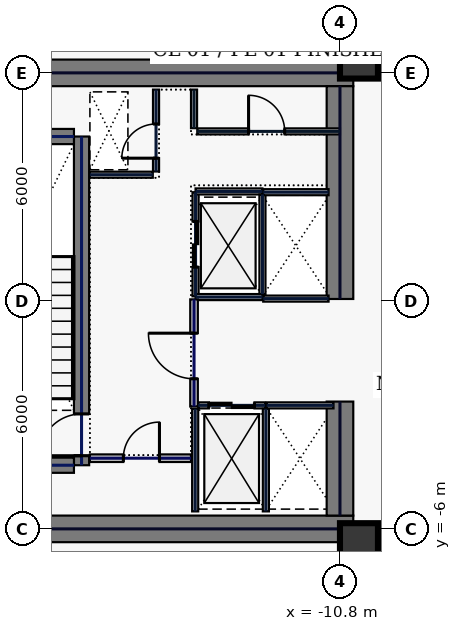
"""IFC4 building model, lengths in metres.
Left out: names, types, materials, properties, quantities, classifications, styles, units other than length and angle.
Written with IfcOpenShell. Run it as: python <this file> out.ifc"""

import sys

from ifc_helpers import new_model, si_unit, direction, frame, frame_2d, origin, origin_2d, place, context, subcontext, project, spatial, rectangle, hollow_rectangle, extrude, element, fill, save


model = new_model("IFC4")
c1 = context("Model", 3, precision=1e-05, world=origin(), true_north=direction((0.0, 1.0)))
c2 = subcontext(c1, "Body", "Model", "MODEL_VIEW")
j1 = project(units=[si_unit("LENGTHUNIT", "METRE"), si_unit("PLANEANGLEUNIT", "RADIAN")], contexts=[c1])
p1 = place(None, origin())
s1 = spatial("IfcSite", under=j1, at=p1, CompositionType="ELEMENT")
p2 = place(p1, origin())
s2 = spatial("IfcBuilding", under=s1, at=p2, CompositionType="ELEMENT")
p3 = place(p2, frame((0.0, 0.0, 93.4)))
s3 = spatial("IfcBuildingStorey", under=s2, at=p3, CompositionType="ELEMENT", Elevation=93.4)
for number, where, z_axis, x_axis in (
    (1, (-22.0, 6.0, 0.0), (0.0, 0.0, 1.0), (1.0, 0.0, 0.0)),
    (2, (-22.0, -6.0, 0.0), (0.0, 0.0, 1.0), (1.0, 0.0, 0.0)),
):
    element("IfcWall", number, at=place(p3, frame(where, z_axis=z_axis, x_axis=x_axis)), inside=s3, PredefinedType="SHEAR", context=c2, shape_type="SweptSolid", body=[
        extrude(rectangle(XDim=11.55, YDim=0.7, at=frame_2d((5.775, 0.0))), origin(), (0.0, 0.0, 1.0), 3.74),
    ])
p4 = place(p3, frame((-10.8, -5.65, 0.0), z_axis=(0.0, 0.0, 1.0), x_axis=(0.0, 1.0, 0.0)))
e3 = element("IfcWall", 3, at=p4, inside=s3, PredefinedType="SHEAR", context=c2, shape_type="SweptSolid", body=[
    extrude(rectangle(XDim=3.0, YDim=0.7, at=frame_2d((1.5, 0.0))), origin(), (0.0, 0.0, 1.0), 3.74),
])
p5 = place(p3, frame((-10.8, 0.05, 0.0), z_axis=(0.0, 0.0, 1.0), x_axis=(0.0, 1.0, 0.0)))
e4 = element("IfcWall", 4, at=p5, inside=s3, PredefinedType="SHEAR", context=c2, shape_type="SweptSolid", body=[
    extrude(rectangle(XDim=5.6, YDim=0.7, at=frame_2d((2.8, 0.0))), origin(), (0.0, 0.0, 1.0), 3.74),
])
p6 = place(p3, frame((-17.6, -4.325, 0.0), z_axis=(0.0, 0.0, 1.0), x_axis=(0.0, 1.0, 0.0)))
e5 = element("IfcWall", 5, at=p6, inside=s3, PredefinedType="SHEAR", context=c2, shape_type="SweptSolid", body=[
    extrude(rectangle(XDim=8.65, YDim=0.4, at=frame_2d((4.325, 0.0))), origin(), (0.0, 0.0, 1.0), 3.74),
])
p7 = place(p6, frame((0.25, 0.0, 0.0)))
e6 = element("IfcOpeningElement", 6, at=p7, cuts=e5, PredefinedType="OPENING", context=c2, shape_type="SweptSolid", body=[
    extrude(rectangle(XDim=1.1, YDim=2.2, at=frame_2d((0.55, 1.1))), frame((0.0, 0.21, 0.0), z_axis=(0.0, -1.0, 0.0), x_axis=(1.0, 0.0, 0.0)), (0.0, 0.0, 1.0), 0.42),
])
for number, where, z_axis, x_axis in (
    (7, (-21.2, -4.325, 0.0), (0.0, 0.0, 1.0), (1.0, 0.0, 0.0)),
    (8, (-21.2, 4.325, 0.0), (0.0, 0.0, 1.0), (1.0, 0.0, 0.0)),
):
    element("IfcWall", number, at=place(p3, frame(where, z_axis=z_axis, x_axis=x_axis)), inside=s3, PredefinedType="SHEAR", context=c2, shape_type="SweptSolid", body=[
        extrude(rectangle(XDim=3.4, YDim=0.4, at=frame_2d((1.7, 0.0))), origin(), (0.0, 0.0, 1.0), 3.74),
    ])
for number, where, z_axis, x_axis in (
    (9, (-10.3, -6.35, 0.0), (0.0, 0.0, 1.0), (1.0, 0.0, 0.0)),
    (10, (-10.3, 6.35, 0.0), (0.0, 0.0, 1.0), (1.0, 0.0, 0.0)),
):
    element("IfcColumn", number, at=place(p3, frame(where, z_axis=z_axis, x_axis=x_axis)), inside=s3, PredefinedType="COLUMN", context=c2, shape_type="SweptSolid", body=[
        extrude(hollow_rectangle(XDim=1.0, YDim=1.0, WallThickness=0.045, at=origin_2d()), origin(), (0.0, 0.0, 1.0), 3.74),
    ])
p8 = place(p3, frame((-14.6, 0.12, 0.0), z_axis=(0.0, 0.0, 1.0), x_axis=(0.0, 1.0, 0.0)))
e11 = element("IfcWall", 11, at=p8, inside=s3, PredefinedType="PARTITIONING", context=c2, shape_type="SweptSolid", body=[
    extrude(rectangle(XDim=2.74, YDim=0.16, at=frame_2d((1.37, 0.0))), origin(), (0.0, 0.0, 1.0), 3.74),
])
p9 = place(p8, frame((0.77, 0.0, 0.0)))
e12 = element("IfcOpeningElement", 12, at=p9, cuts=e11, PredefinedType="OPENING", context=c2, shape_type="SweptSolid", body=[
    extrude(rectangle(XDim=1.2, YDim=2.2, at=frame_2d((0.6, 1.1))), frame((0.0, 0.09, 0.0), z_axis=(0.0, -1.0, 0.0), x_axis=(1.0, 0.0, 0.0)), (0.0, 0.0, 1.0), 0.18),
])
for number, where, z_axis, x_axis in (
    (13, (-14.6, 0.1, 0.0), (0.0, 0.0, 1.0), (1.0, 0.0, 0.0)),
    (14, (-14.6, 2.88, 0.0), (0.0, 0.0, 1.0), (1.0, 0.0, 0.0)),
):
    element("IfcWall", number, at=place(p3, frame(where, z_axis=z_axis, x_axis=x_axis)), inside=s3, PredefinedType="PARTITIONING", context=c2, shape_type="SweptSolid", body=[
        extrude(rectangle(XDim=1.76, YDim=0.16, at=frame_2d((0.88, 0.0))), origin(), (0.0, 0.0, 1.0), 3.74),
    ])
p10 = place(p3, frame((-12.84, 0.18, 0.0), z_axis=(0.0, 0.0, 1.0), x_axis=(0.0, 1.0, 0.0)))
e15 = element("IfcWall", 15, at=p10, inside=s3, PredefinedType="PARTITIONING", context=c2, shape_type="SweptSolid", body=[
    extrude(rectangle(XDim=2.62, YDim=0.16, at=frame_2d((1.31, 0.0))), origin(), (0.0, 0.0, 1.0), 3.74),
])
p11 = place(p3, frame((-14.53, -2.75, 0.0), z_axis=(0.0, 0.0, 1.0), x_axis=(1.0, 0.0, 0.0)))
e16 = element("IfcWall", 16, at=p11, inside=s3, PredefinedType="PARTITIONING", context=c2, shape_type="SweptSolid", body=[
    extrude(rectangle(XDim=1.76, YDim=0.16, at=frame_2d((0.88, 0.0))), origin(), (0.0, 0.0, 1.0), 3.74),
])
p12 = place(p11, frame((0.28, 0.0, 0.0)))
e17 = element("IfcOpeningElement", 17, at=p12, cuts=e16, PredefinedType="OPENING", context=c2, shape_type="SweptSolid", body=[
    extrude(rectangle(XDim=1.2, YDim=2.2, at=frame_2d((0.6, 1.1))), frame((0.0, 0.09, 0.0), z_axis=(0.0, -1.0, 0.0), x_axis=(1.0, 0.0, 0.0)), (0.0, 0.0, 1.0), 0.18),
])
for number, where, z_axis, x_axis in (
    (18, (-12.75, -5.54, 0.0), (0.0, 0.0, 1.0), (0.0, 1.0, 0.0)),
    (19, (-14.61, -5.54, 0.0), (0.0, 0.0, 1.0), (0.0, 1.0, 0.0)),
):
    element("IfcWall", number, at=place(p3, frame(where, z_axis=z_axis, x_axis=x_axis)), inside=s3, PredefinedType="PARTITIONING", context=c2, shape_type="SweptSolid", body=[
        extrude(rectangle(XDim=2.7, YDim=0.16, at=frame_2d((1.35, 0.0))), origin(), (0.0, 0.0, 1.0), 3.74),
    ])
p13 = place(p3, frame((-12.73, -2.75, 0.0), z_axis=(0.0, 0.0, 1.0), x_axis=(1.0, 0.0, 0.0)))
e20 = element("IfcWall", 20, at=p13, inside=s3, PredefinedType="PARTITIONING", context=c2, shape_type="SweptSolid", body=[
    extrude(rectangle(XDim=1.76, YDim=0.16, at=frame_2d((0.88, 0.0))), origin(), (0.0, 0.0, 1.0), 3.74),
])
for number, where, z_axis, x_axis in (
    (21, (-12.82, 0.06, 0.0), (0.0, 0.0, 1.0), (1.0, 0.0, 0.0)),
    (22, (-12.82, 2.86, 0.0), (0.0, 0.0, 1.0), (1.0, 0.0, 0.0)),
):
    element("IfcWall", number, at=place(p3, frame(where, z_axis=z_axis, x_axis=x_axis)), inside=s3, PredefinedType="PARTITIONING", context=c2, shape_type="SweptSolid", body=[
        extrude(rectangle(XDim=1.72, YDim=0.16, at=frame_2d((0.86, 0.0))), origin(), (0.0, 0.0, 1.0), 3.74),
    ])
p14 = place(p3, frame((-15.64, 3.405, 0.0), z_axis=(0.0, 0.0, 1.0), x_axis=(0.0, 1.0, 0.0)))
e23 = element("IfcWall", 23, at=p14, inside=s3, PredefinedType="PARTITIONING", context=c2, shape_type="SweptSolid", body=[
    extrude(rectangle(XDim=2.155, YDim=0.16, at=frame_2d((1.078, 0.0))), origin(), (0.0, 0.0, 1.0), 3.74),
])
p15 = place(p14, frame((0.35, 0.0, 0.0)))
e24 = element("IfcOpeningElement", 24, at=p15, cuts=e23, PredefinedType="OPENING", context=c2, shape_type="SweptSolid", body=[
    extrude(rectangle(XDim=0.9, YDim=2.2, at=frame_2d((0.45, 1.1))), frame((0.0, 0.09, 0.0), z_axis=(0.0, -1.0, 0.0), x_axis=(1.0, 0.0, 0.0)), (0.0, 0.0, 1.0), 0.18),
])
p16 = place(p3, frame((-17.38, 3.32, 0.0), z_axis=(0.0, 0.0, 1.0), x_axis=(1.0, 0.0, 0.0)))
e25 = element("IfcWall", 25, at=p16, inside=s3, PredefinedType="PARTITIONING", context=c2, shape_type="SweptSolid", body=[
    extrude(rectangle(XDim=1.655, YDim=0.16, at=frame_2d((0.827, 0.0))), origin(), (0.0, 0.0, 1.0), 3.74),
])
p17 = place(p3, frame((-17.38, -4.14, 0.0), z_axis=(0.0, 0.0, 1.0), x_axis=(1.0, 0.0, 0.0)))
e26 = element("IfcWall", 26, at=p17, inside=s3, PredefinedType="SOLIDWALL", context=c2, shape_type="SweptSolid", body=[
    extrude(rectangle(XDim=2.66, YDim=0.2, at=frame_2d((1.33, 0.0))), origin(), (0.0, 0.0, 1.0), 3.74),
])
p18 = place(p17, frame((0.88, 0.0, 0.0)))
e27 = element("IfcOpeningElement", 27, at=p18, cuts=e26, PredefinedType="OPENING", context=c2, shape_type="SweptSolid", body=[
    extrude(rectangle(XDim=0.95, YDim=2.2, at=frame_2d((0.475, 1.1))), frame((0.0, 0.11, 0.0), z_axis=(0.0, -1.0, 0.0), x_axis=(1.0, 0.0, 0.0)), (0.0, 0.0, 1.0), 0.22),
])
p19 = place(p3, frame((-14.555, 4.46, 0.0), z_axis=(0.0, 0.0, 1.0), x_axis=(1.0, 0.0, 0.0)))
e28 = element("IfcWall", 28, at=p19, inside=s3, PredefinedType="PARTITIONING", context=c2, shape_type="SweptSolid", body=[
    extrude(rectangle(XDim=3.755, YDim=0.16, at=frame_2d((1.877, 0.0))), origin(), (0.0, 0.0, 1.0), 3.74),
])
p20 = place(p19, frame((1.35, 0.0, 0.0)))
e29 = element("IfcOpeningElement", 29, at=p20, cuts=e28, PredefinedType="OPENING", context=c2, shape_type="SweptSolid", body=[
    extrude(rectangle(XDim=0.95, YDim=2.2, at=frame_2d((0.475, 1.1))), frame((0.0, 0.09, 0.0), z_axis=(0.0, -1.0, 0.0), x_axis=(1.0, 0.0, 0.0)), (0.0, 0.0, 1.0), 0.18),
])
p21 = place(p3, frame((-14.64, 4.545, 0.0), z_axis=(0.0, 0.0, 1.0), x_axis=(0.0, 1.0, 0.0)))
e30 = element("IfcWall", 30, at=p21, inside=s3, PredefinedType="PARTITIONING", context=c2, shape_type="SweptSolid", body=[
    extrude(rectangle(XDim=1.015, YDim=0.16, at=frame_2d((0.508, 0.0))), origin(), (0.0, 0.0, 1.0), 3.74),
])
p22 = place(p3, frame((-14.64, -2.78, 0.0), z_axis=(0.0, 0.0, 1.0), x_axis=(0.0, 1.0, 0.0)))
e31 = element("IfcWall", 31, at=p22, inside=s3, PredefinedType="SOLIDWALL", context=c2, shape_type="SweptSolid", body=[
    extrude(rectangle(XDim=2.82, YDim=0.2, at=frame_2d((1.41, 0.0))), origin(), (0.0, 0.0, 1.0), 3.74),
])
p23 = place(p22, frame((0.73, 0.0, 0.0)))
e32 = element("IfcOpeningElement", 32, at=p23, cuts=e31, PredefinedType="OPENING", context=c2, shape_type="SweptSolid", body=[
    extrude(rectangle(XDim=1.2, YDim=2.2, at=frame_2d((0.6, 1.1))), frame((0.0, 0.11, 0.0), z_axis=(0.0, -1.0, 0.0), x_axis=(1.0, 0.0, 0.0)), (0.0, 0.0, 1.0), 0.22),
])
p24 = place(p3, frame((-10.58, -7.785, 0.0), z_axis=(0.0, 0.0, 1.0), x_axis=(0.0, 1.0, 0.0)))
e33 = element("IfcWall", 33, at=p24, inside=s3, PredefinedType="PARTITIONING", context=c2, shape_type="SweptSolid", body=[
    extrude(rectangle(XDim=1.365, YDim=0.16, at=frame_2d((0.683, 0.0))), origin(), (0.0, 0.0, 1.0), 1.535),
])
p25 = place(p3, frame((-10.58, 6.42, 0.0), z_axis=(0.0, 0.0, 1.0), x_axis=(0.0, 1.0, 0.0)))
e34 = element("IfcWall", 34, at=p25, inside=s3, PredefinedType="PARTITIONING", context=c2, shape_type="SweptSolid", body=[
    extrude(rectangle(XDim=1.465, YDim=0.16, at=frame_2d((0.732, 0.0))), origin(), (0.0, 0.0, 1.0), 3.74),
])
p26 = place(p7, origin())
e35 = element("IfcDoor", 35, at=p26, inside=s3, OperationType="SINGLE_SWING_LEFT", PredefinedType="DOOR", context=c2, shape_type="SweptSolid", body=[
    extrude(rectangle(XDim=1.1, YDim=2.2, at=frame_2d((0.55, 1.1))), frame((0.0, 0.025, 0.0), z_axis=(0.0, -1.0, 0.0), x_axis=(1.0, 0.0, 0.0)), (0.0, 0.0, 1.0), 0.05),
])
fill(e6, e35)
p27 = place(p9, origin())
e36 = element("IfcDoor", 36, at=p27, inside=s3, OperationType="SLIDING_TO_LEFT", PredefinedType="DOOR", context=c2, shape_type="SweptSolid", body=[
    extrude(rectangle(XDim=1.2, YDim=2.2, at=frame_2d((0.6, 1.1))), frame((0.0, 0.025, 0.0), z_axis=(0.0, -1.0, 0.0), x_axis=(1.0, 0.0, 0.0)), (0.0, 0.0, 1.0), 0.05),
])
fill(e12, e36)
p28 = place(p12, origin())
e37 = element("IfcDoor", 37, at=p28, inside=s3, OperationType="SLIDING_TO_LEFT", PredefinedType="DOOR", context=c2, shape_type="SweptSolid", body=[
    extrude(rectangle(XDim=1.2, YDim=2.2, at=frame_2d((0.6, 1.1))), frame((0.0, 0.025, 0.0), z_axis=(0.0, -1.0, 0.0), x_axis=(1.0, 0.0, 0.0)), (0.0, 0.0, 1.0), 0.05),
])
fill(e17, e37)
p29 = place(p15, origin())
e38 = element("IfcDoor", 38, at=p29, inside=s3, OperationType="SINGLE_SWING_LEFT", PredefinedType="DOOR", context=c2, shape_type="SweptSolid", body=[
    extrude(rectangle(XDim=0.9, YDim=2.2, at=frame_2d((0.45, 1.1))), frame((0.0, 0.025, 0.0), z_axis=(0.0, -1.0, 0.0), x_axis=(1.0, 0.0, 0.0)), (0.0, 0.0, 1.0), 0.05),
])
fill(e24, e38)
p30 = place(p18, origin())
e39 = element("IfcDoor", 39, at=p30, inside=s3, OperationType="SINGLE_SWING_RIGHT", PredefinedType="DOOR", context=c2, shape_type="SweptSolid", body=[
    extrude(rectangle(XDim=0.95, YDim=2.2, at=frame_2d((0.475, 1.1))), frame((0.0, 0.025, 0.0), z_axis=(0.0, -1.0, 0.0), x_axis=(1.0, 0.0, 0.0)), (0.0, 0.0, 1.0), 0.05),
])
fill(e27, e39)
p31 = place(p20, origin())
e40 = element("IfcDoor", 40, at=p31, inside=s3, OperationType="SINGLE_SWING_LEFT", PredefinedType="DOOR", context=c2, shape_type="SweptSolid", body=[
    extrude(rectangle(XDim=0.95, YDim=2.2, at=frame_2d((0.475, 1.1))), frame((0.0, 0.025, 0.0), z_axis=(0.0, -1.0, 0.0), x_axis=(1.0, 0.0, 0.0)), (0.0, 0.0, 1.0), 0.05),
])
fill(e29, e40)
p32 = place(p23, origin())
e41 = element("IfcDoor", 41, at=p32, inside=s3, OperationType="SINGLE_SWING_RIGHT", PredefinedType="DOOR", context=c2, shape_type="SweptSolid", body=[
    extrude(rectangle(XDim=1.2, YDim=2.2, at=frame_2d((0.6, 1.1))), frame((0.0, 0.025, 0.0), z_axis=(0.0, -1.0, 0.0), x_axis=(1.0, 0.0, 0.0)), (0.0, 0.0, 1.0), 0.05),
])
fill(e32, e41)
save(model, sys.argv[1])
